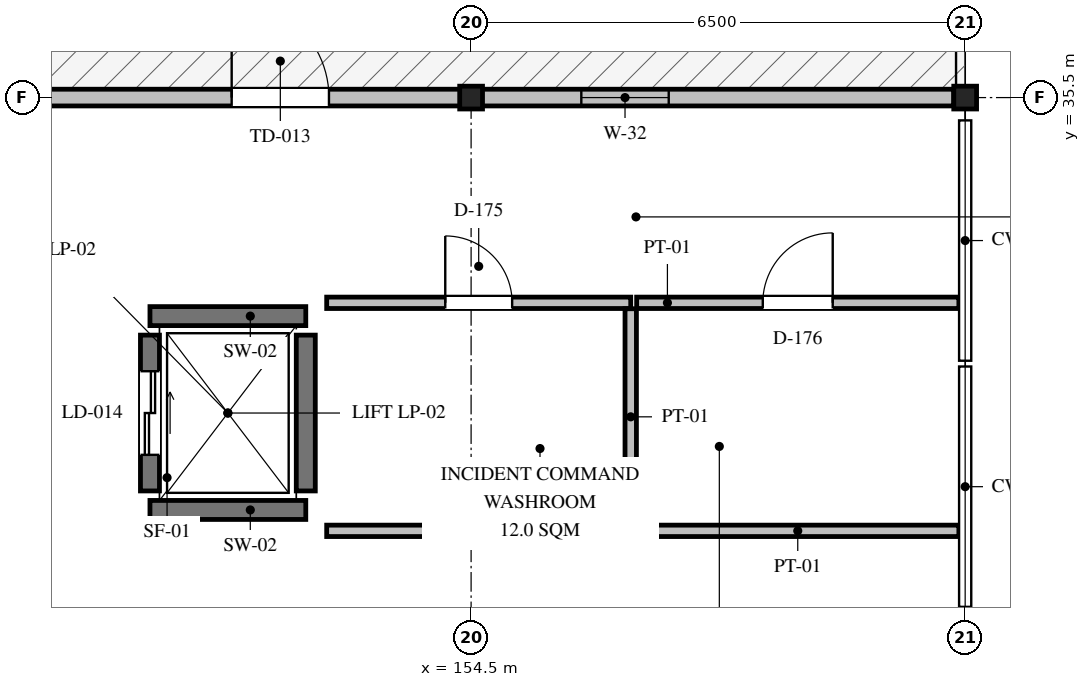
"""IFC4 building model, lengths in metres.
Left out: names, types, materials, properties, quantities, classifications, styles, units other than length and angle.
Written with IfcOpenShell. Run it as: python <this file> out.ifc"""

import sys

from ifc_helpers import new_model, si_unit, direction, frame, frame_2d, origin, origin_2d, place, context, subcontext, project, spatial, rectangle, i_section, extrude, element, fill, save


model = new_model("IFC4")
c1 = context("Model", 3, precision=1e-05, world=origin(), true_north=direction((0.0, 1.0)))
c2 = subcontext(c1, "Body", "Model", "MODEL_VIEW")
j1 = project(units=[si_unit("LENGTHUNIT", "METRE"), si_unit("PLANEANGLEUNIT", "RADIAN")], contexts=[c1])
p1 = place(None, origin())
s1 = spatial("IfcSite", under=j1, at=p1, CompositionType="ELEMENT")
p2 = place(p1, origin())
s2 = spatial("IfcBuilding", under=s1, at=p2, CompositionType="ELEMENT")
p3 = place(p2, frame((0.0, 0.0, 14.25)))
s3 = spatial("IfcBuildingStorey", under=s2, at=p3, CompositionType="ELEMENT", Elevation=14.25)
for number, where, z_axis, x_axis in (
    (1, (154.5, 35.5, 0.0), (0.0, 0.0, 1.0), (1.0, 0.0, 0.0)),
    (2, (161.0, 35.5, 0.0), (0.0, 0.0, 1.0), (1.0, 0.0, 0.0)),
):
    element("IfcColumn", number, at=place(p3, frame(where, z_axis=z_axis, x_axis=x_axis)), inside=s3, PredefinedType="COLUMN", context=c2, shape_type="SweptSolid", body=[
        extrude(i_section(OverallWidth=0.3, OverallDepth=0.3, WebThickness=0.01, FlangeThickness=0.015, FilletRadius=0.018, at=origin_2d()), origin(), (0.0, 0.0, 1.0), 4.2),
    ])
p4 = place(p3, frame((140.15, 35.5, 0.0), z_axis=(0.0, 0.0, 1.0), x_axis=(1.0, 0.0, 0.0)))
e3 = element("IfcWall", 3, at=p4, inside=s3, PredefinedType="SOLIDWALL", context=c2, shape_type="SweptSolid", body=[
    extrude(rectangle(XDim=20.7, YDim=0.22, at=frame_2d((10.35, 0.0))), origin(), (0.0, 0.0, 1.0), 3.424),
])
p5 = place(p4, frame((11.2, 0.0, 0.0)))
e4 = element("IfcOpeningElement", 4, at=p5, cuts=e3, PredefinedType="OPENING", context=c2, shape_type="SweptSolid", body=[
    extrude(rectangle(XDim=1.28, YDim=2.35, at=frame_2d((0.64, 1.175))), frame((0.0, 0.12, 0.0), z_axis=(0.0, -1.0, 0.0), x_axis=(1.0, 0.0, 0.0)), (0.0, 0.0, 1.0), 0.24),
])
p6 = place(p4, frame((2.0, 0.0, 1.0)))
e5 = element("IfcOpeningElement", 5, at=p6, cuts=e3, PredefinedType="OPENING", context=c2, shape_type="SweptSolid", body=[
    extrude(rectangle(XDim=1.0, YDim=2.0, at=frame_2d((0.5, 1.0))), frame((0.0, 0.12, 0.0), z_axis=(0.0, -1.0, 0.0), x_axis=(1.0, 0.0, 0.0)), (0.0, 0.0, 1.0), 0.24),
])
p7 = place(p4, frame((15.8, 0.0, 1.0)))
e6 = element("IfcOpeningElement", 6, at=p7, cuts=e3, PredefinedType="OPENING", context=c2, shape_type="SweptSolid", body=[
    extrude(rectangle(XDim=1.15, YDim=2.0, at=frame_2d((0.575, 1.0))), frame((0.0, 0.12, 0.0), z_axis=(0.0, -1.0, 0.0), x_axis=(1.0, 0.0, 0.0)), (0.0, 0.0, 1.0), 0.24),
])
for number, where, z_axis, x_axis in (
    (7, (150.275, 30.075, 0.0), (0.0, 0.0, 1.0), (1.0, 0.0, 0.0)),
    (8, (150.275, 32.625, 0.0), (0.0, 0.0, 1.0), (1.0, 0.0, 0.0)),
):
    element("IfcWall", number, at=place(p3, frame(where, z_axis=z_axis, x_axis=x_axis)), inside=s3, PredefinedType="SHEAR", context=c2, shape_type="SweptSolid", body=[
        extrude(rectangle(XDim=2.05, YDim=0.25, at=frame_2d((1.025, 0.0))), origin(), (0.0, 0.0, 1.0), 3.98),
    ])
p8 = place(p3, frame((150.275, 30.325, 0.0), z_axis=(0.0, 0.0, 1.0), x_axis=(0.0, 1.0, 0.0)))
e9 = element("IfcWall", 9, at=p8, inside=s3, PredefinedType="SHEAR", context=c2, shape_type="SweptSolid", body=[
    extrude(rectangle(XDim=2.05, YDim=0.25, at=frame_2d((1.025, 0.0))), origin(), (0.0, 0.0, 1.0), 3.98),
])
p9 = place(p8, frame((0.475, 0.0, 0.0)))
e10 = element("IfcOpeningElement", 10, at=p9, cuts=e9, PredefinedType="OPENING", context=c2, shape_type="SweptSolid", body=[
    extrude(rectangle(XDim=1.1, YDim=2.15, at=frame_2d((0.55, 1.075))), frame((0.0, 0.135, 0.0), z_axis=(0.0, -1.0, 0.0), x_axis=(1.0, 0.0, 0.0)), (0.0, 0.0, 1.0), 0.27),
])
p10 = place(p3, frame((152.325, 30.325, 0.0), z_axis=(0.0, 0.0, 1.0), x_axis=(0.0, 1.0, 0.0)))
e11 = element("IfcWall", 11, at=p10, inside=s3, PredefinedType="SHEAR", context=c2, shape_type="SweptSolid", body=[
    extrude(rectangle(XDim=2.05, YDim=0.25, at=frame_2d((1.025, 0.0))), origin(), (0.0, 0.0, 1.0), 3.98),
])
p11 = place(p3, frame((152.6, 29.8, 0.0), z_axis=(0.0, 0.0, 1.0), x_axis=(1.0, 0.0, 0.0)))
e12 = element("IfcWall", 12, at=p11, inside=s3, PredefinedType="PARTITIONING", context=c2, shape_type="SweptSolid", body=[
    extrude(rectangle(XDim=4.0, YDim=0.15, at=frame_2d((2.0, 0.0))), origin(), (0.0, 0.0, 1.0), 3.98),
])
p12 = place(p3, frame((152.6, 32.8, 0.0), z_axis=(0.0, 0.0, 1.0), x_axis=(1.0, 0.0, 0.0)))
e13 = element("IfcWall", 13, at=p12, inside=s3, PredefinedType="PARTITIONING", context=c2, shape_type="SweptSolid", body=[
    extrude(rectangle(XDim=4.0, YDim=0.15, at=frame_2d((2.0, 0.0))), origin(), (0.0, 0.0, 1.0), 3.98),
])
p13 = place(p12, frame((1.56, 0.0, 0.0)))
e14 = element("IfcOpeningElement", 14, at=p13, cuts=e13, PredefinedType="OPENING", context=c2, shape_type="SweptSolid", body=[
    extrude(rectangle(XDim=0.88, YDim=2.1, at=frame_2d((0.44, 1.05))), frame((0.0, 0.085, 0.0), z_axis=(0.0, -1.0, 0.0), x_axis=(1.0, 0.0, 0.0)), (0.0, 0.0, 1.0), 0.17),
])
p14 = place(p3, frame((156.6, 29.878, 0.0), z_axis=(0.0, 0.0, 1.0), x_axis=(0.0, 1.0, 0.0)))
e15 = element("IfcWall", 15, at=p14, inside=s3, PredefinedType="PARTITIONING", context=c2, shape_type="SweptSolid", body=[
    extrude(rectangle(XDim=2.844, YDim=0.15, at=frame_2d((1.422, 0.0))), origin(), (0.0, 0.0, 1.0), 3.724),
])
p15 = place(p3, frame((156.678, 29.8, 0.0), z_axis=(0.0, 0.0, 1.0), x_axis=(1.0, 0.0, 0.0)))
e16 = element("IfcWall", 16, at=p15, inside=s3, PredefinedType="PARTITIONING", context=c2, shape_type="SweptSolid", body=[
    extrude(rectangle(XDim=4.239, YDim=0.15, at=frame_2d((2.12, 0.0))), origin(), (0.0, 0.0, 1.0), 3.98),
])
p16 = place(p3, frame((156.678, 32.8, 0.0), z_axis=(0.0, 0.0, 1.0), x_axis=(1.0, 0.0, 0.0)))
e17 = element("IfcWall", 17, at=p16, inside=s3, PredefinedType="PARTITIONING", context=c2, shape_type="SweptSolid", body=[
    extrude(rectangle(XDim=4.239, YDim=0.15, at=frame_2d((2.12, 0.0))), origin(), (0.0, 0.0, 1.0), 3.98),
])
p17 = place(p16, frame((1.659, 0.0, 0.0)))
e18 = element("IfcOpeningElement", 18, at=p17, cuts=e17, PredefinedType="OPENING", context=c2, shape_type="SweptSolid", body=[
    extrude(rectangle(XDim=0.92, YDim=2.1, at=frame_2d((0.46, 1.05))), frame((0.0, 0.085, 0.0), z_axis=(0.0, -1.0, 0.0), x_axis=(1.0, 0.0, 0.0)), (0.0, 0.0, 1.0), 0.17),
])
p18 = place(p5, origin())
e19 = element("IfcDoor", 19, at=p18, inside=s3, OperationType="SINGLE_SWING_LEFT", PredefinedType="DOOR", context=c2, shape_type="SweptSolid", body=[
    extrude(rectangle(XDim=1.28, YDim=2.35, at=frame_2d((0.64, 1.175))), frame((0.0, 0.025, 0.0), z_axis=(0.0, -1.0, 0.0), x_axis=(1.0, 0.0, 0.0)), (0.0, 0.0, 1.0), 0.05),
])
fill(e4, e19)
p19 = place(p7, origin())
e20 = element("IfcWindow", 20, at=p19, inside=s3, PartitioningType="SINGLE_PANEL", PredefinedType="WINDOW", context=c2, shape_type="SweptSolid", body=[
    extrude(rectangle(XDim=1.15, YDim=2.0, at=frame_2d((0.575, 1.0))), frame((0.0, 0.03, 0.0), z_axis=(0.0, -1.0, 0.0), x_axis=(1.0, 0.0, 0.0)), (0.0, 0.0, 1.0), 0.06),
])
fill(e6, e20)
p20 = place(p9, origin())
e21 = element("IfcDoor", 21, at=p20, inside=s3, OperationType="DOUBLE_DOOR_SLIDING", PredefinedType="DOOR", context=c2, shape_type="SweptSolid", body=[
    extrude(rectangle(XDim=1.1, YDim=2.15, at=frame_2d((0.55, 1.075))), frame((0.0, 0.025, 0.0), z_axis=(0.0, -1.0, 0.0), x_axis=(1.0, 0.0, 0.0)), (0.0, 0.0, 1.0), 0.05),
])
fill(e10, e21)
p21 = place(p13, origin())
e22 = element("IfcDoor", 22, at=p21, inside=s3, OperationType="SINGLE_SWING_LEFT", PredefinedType="DOOR", context=c2, shape_type="SweptSolid", body=[
    extrude(rectangle(XDim=0.88, YDim=2.1, at=frame_2d((0.44, 1.05))), frame((0.0, 0.025, 0.0), z_axis=(0.0, -1.0, 0.0), x_axis=(1.0, 0.0, 0.0)), (0.0, 0.0, 1.0), 0.05),
])
fill(e14, e22)
p22 = place(p17, origin())
e23 = element("IfcDoor", 23, at=p22, inside=s3, OperationType="SINGLE_SWING_RIGHT", PredefinedType="DOOR", context=c2, shape_type="SweptSolid", body=[
    extrude(rectangle(XDim=0.92, YDim=2.1, at=frame_2d((0.46, 1.05))), frame((0.0, 0.025, 0.0), z_axis=(0.0, -1.0, 0.0), x_axis=(1.0, 0.0, 0.0)), (0.0, 0.0, 1.0), 0.05),
])
fill(e18, e23)
save(model, sys.argv[1])
